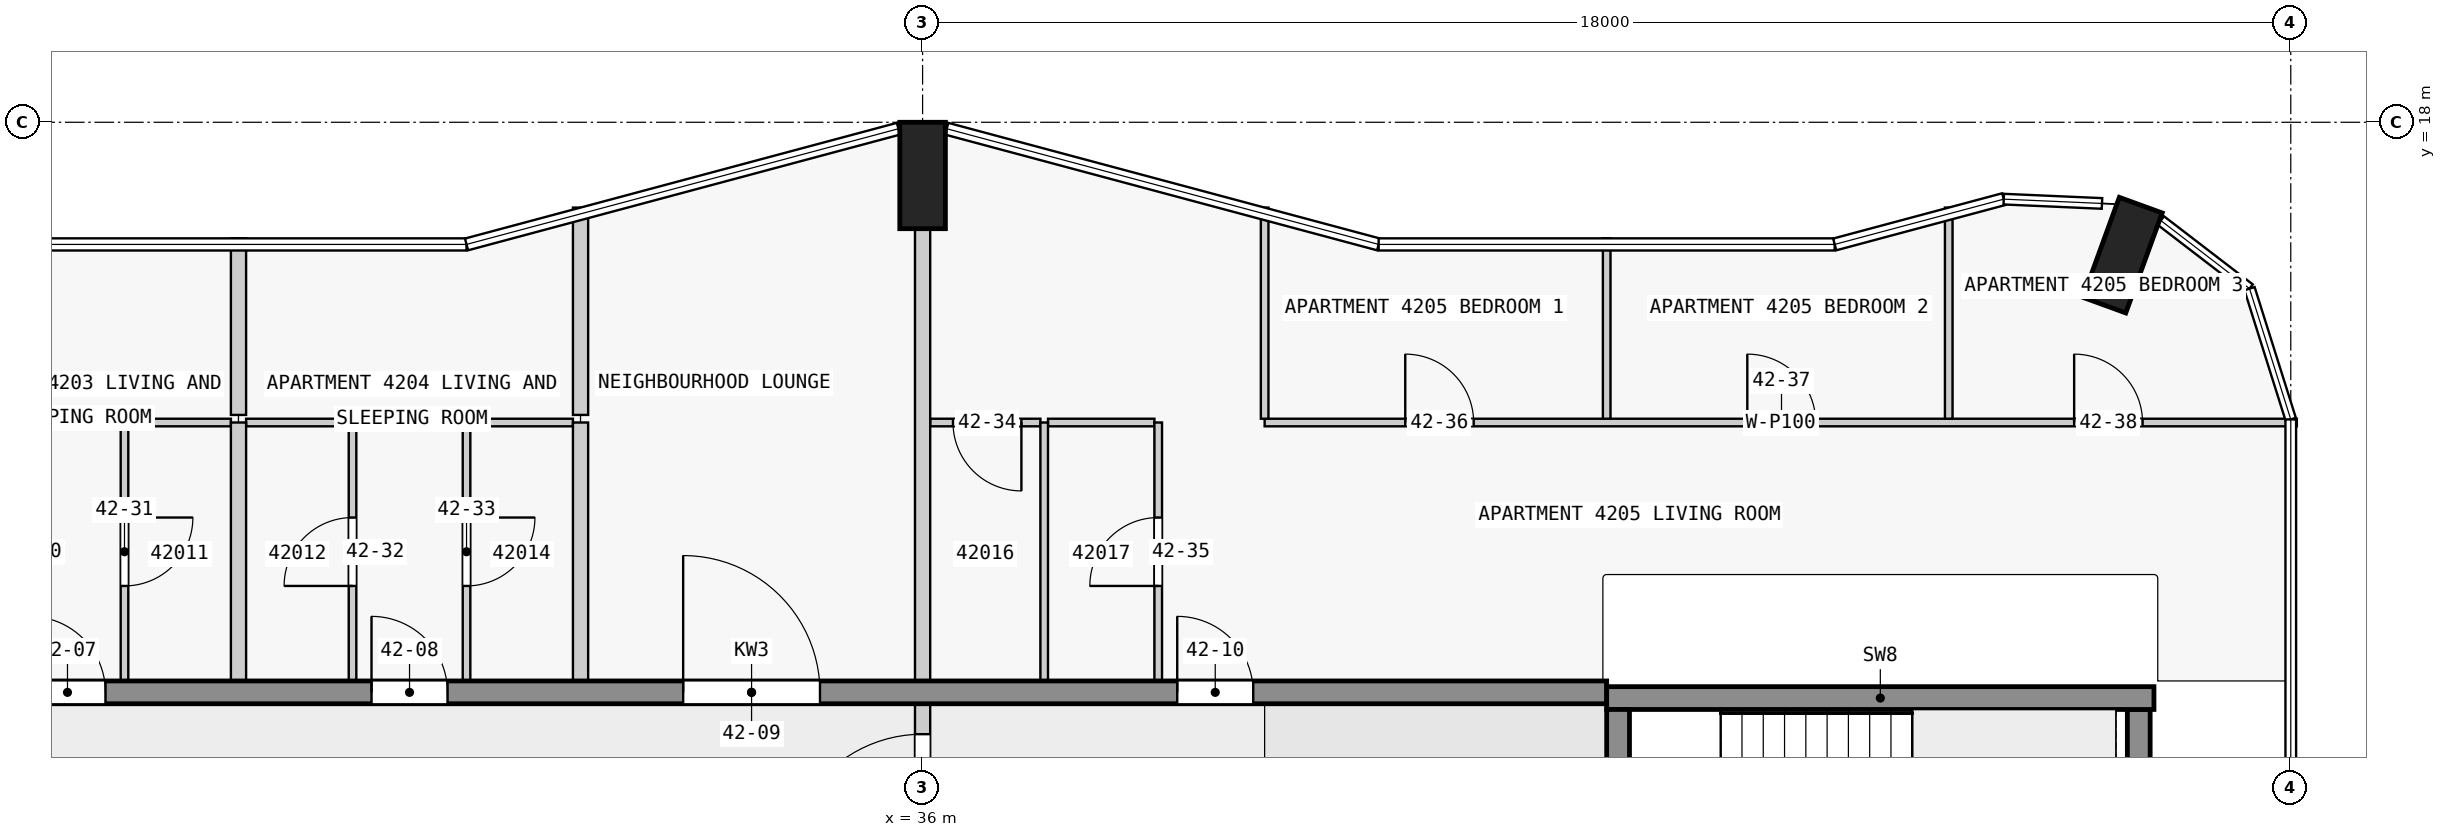
"""IFC4 building model, lengths in metres.
Left out: names, types, materials, properties, quantities, classifications, styles, units other than length and angle.
Written with IfcOpenShell. Run it as: python <this file> out.ifc"""

import sys

from ifc_helpers import new_model, si_unit, direction, frame, frame_2d, origin, origin_2d, place, context, subcontext, project, spatial, rectangle, extrude, element, fill, save


model = new_model("IFC4")
c1 = context("Model", 3, precision=1e-05, world=origin(), true_north=direction((0.0, 1.0)))
c2 = subcontext(c1, "Body", "Model", "MODEL_VIEW")
j1 = project(units=[si_unit("LENGTHUNIT", "METRE"), si_unit("PLANEANGLEUNIT", "RADIAN")], contexts=[c1])
p1 = place(None, origin())
s1 = spatial("IfcSite", under=j1, at=p1, CompositionType="ELEMENT")
p2 = place(p1, origin())
s2 = spatial("IfcBuilding", under=s1, at=p2, CompositionType="ELEMENT")
p3 = place(p2, frame((0.0, 0.0, 163.9)))
s3 = spatial("IfcBuildingStorey", under=s2, at=p3, CompositionType="ELEMENT", Elevation=163.9)
for number, where, z_axis, x_axis in (
    (1, (51.787, 16.252, 0.0), (0.0, 0.0, 1.0), (-0.94, 0.342, 0.0)),
    (2, (36.0, 17.3, 0.0), (0.0, 0.0, 1.0), (1.0, 0.0, 0.0)),
):
    element("IfcColumn", number, at=place(p3, frame(where, z_axis=z_axis, x_axis=x_axis)), inside=s3, PredefinedType="COLUMN", context=c2, shape_type="SweptSolid", body=[
        extrude(rectangle(XDim=0.6, YDim=1.4, at=origin_2d()), origin(), (0.0, 0.0, 1.0), 3.5),
    ])
p4 = place(p3, frame((45.15, 7.725, 0.0), z_axis=(0.0, 0.0, 1.0), x_axis=(0.0, 1.0, 0.0)))
e3 = element("IfcWall", 3, at=p4, inside=s3, PredefinedType="SHEAR", context=c2, shape_type="SweptSolid", body=[
    extrude(rectangle(XDim=2.55, YDim=0.3, at=frame_2d((1.275, 0.0))), origin(), (0.0, 0.0, 1.0), 3.5),
])
p5 = place(p4, frame((0.725, 0.0, 0.0)))
e4 = element("IfcOpeningElement", 4, at=p5, cuts=e3, PredefinedType="OPENING", context=c2, shape_type="SweptSolid", body=[
    extrude(rectangle(XDim=1.1, YDim=2.1, at=frame_2d((0.55, 1.05))), frame((0.0, 0.16, 0.0), z_axis=(0.0, -1.0, 0.0), x_axis=(1.0, 0.0, 0.0)), (0.0, 0.0, 1.0), 0.32),
])
p6 = place(p3, frame((52.0, 7.725, 0.0), z_axis=(0.0, 0.0, 1.0), x_axis=(0.0, 1.0, 0.0)))
e5 = element("IfcWall", 5, at=p6, inside=s3, PredefinedType="SHEAR", context=c2, shape_type="SweptSolid", body=[
    extrude(rectangle(XDim=2.55, YDim=0.3, at=frame_2d((1.275, 0.0))), origin(), (0.0, 0.0, 1.0), 3.5),
])
p7 = place(p3, frame((45.0, 10.425, 0.0), z_axis=(0.0, 0.0, 1.0), x_axis=(1.0, 0.0, 0.0)))
e6 = element("IfcWall", 6, at=p7, inside=s3, PredefinedType="SHEAR", context=c2, shape_type="SweptSolid", body=[
    extrude(rectangle(XDim=7.2, YDim=0.3, at=frame_2d((3.6, 0.0))), origin(), (0.0, 0.0, 1.0), 3.5),
])
p8 = place(p3, frame((22.5, 10.5, 0.0), z_axis=(0.0, 0.0, 1.0), x_axis=(1.0, 0.0, 0.0)))
e7 = element("IfcWall", 7, at=p8, inside=s3, PredefinedType="SHEAR", context=c2, shape_type="SweptSolid", body=[
    extrude(rectangle(XDim=22.5, YDim=0.3, at=frame_2d((11.25, 0.0))), origin(), (0.0, 0.0, 1.0), 3.25),
])
p9 = place(p8, frame((1.75, 0.0, 0.0)))
e8 = element("IfcOpeningElement", 8, at=p9, cuts=e7, PredefinedType="OPENING", context=c2, shape_type="SweptSolid", body=[
    extrude(rectangle(XDim=1.0, YDim=2.1, at=frame_2d((0.5, 1.05))), frame((0.0, 0.16, 0.0), z_axis=(0.0, -1.0, 0.0), x_axis=(1.0, 0.0, 0.0)), (0.0, 0.0, 1.0), 0.32),
])
p10 = place(p8, frame((6.25, 0.0, 0.0)))
e9 = element("IfcOpeningElement", 9, at=p10, cuts=e7, PredefinedType="OPENING", context=c2, shape_type="SweptSolid", body=[
    extrude(rectangle(XDim=1.0, YDim=2.1, at=frame_2d((0.5, 1.05))), frame((0.0, 0.16, 0.0), z_axis=(0.0, -1.0, 0.0), x_axis=(1.0, 0.0, 0.0)), (0.0, 0.0, 1.0), 0.32),
])
p11 = place(p8, frame((10.35, 0.0, 0.0)))
e10 = element("IfcOpeningElement", 10, at=p11, cuts=e7, PredefinedType="OPENING", context=c2, shape_type="SweptSolid", body=[
    extrude(rectangle(XDim=1.8, YDim=2.1, at=frame_2d((0.9, 1.05))), frame((0.0, 0.16, 0.0), z_axis=(0.0, -1.0, 0.0), x_axis=(1.0, 0.0, 0.0)), (0.0, 0.0, 1.0), 0.32),
])
p12 = place(p8, frame((16.85, 0.0, 0.0)))
e11 = element("IfcOpeningElement", 11, at=p12, cuts=e7, PredefinedType="OPENING", context=c2, shape_type="SweptSolid", body=[
    extrude(rectangle(XDim=1.0, YDim=2.1, at=frame_2d((0.5, 1.05))), frame((0.0, 0.16, 0.0), z_axis=(0.0, -1.0, 0.0), x_axis=(1.0, 0.0, 0.0)), (0.0, 0.0, 1.0), 0.32),
])
for number, where, z_axis, x_axis in (
    (12, (26.9, 14.05, 0.0), (0.0, 0.0, 1.0), (-1.0, 0.0, 0.0)),
    (13, (28.45, 14.05, 0.0), (0.0, 0.0, 1.0), (-1.0, 0.0, 0.0)),
    (14, (31.4, 14.05, 0.0), (0.0, 0.0, 1.0), (-1.0, 0.0, 0.0)),
):
    element("IfcWall", number, at=place(p3, frame(where, z_axis=z_axis, x_axis=x_axis)), inside=s3, PredefinedType="PARTITIONING", context=c2, shape_type="SweptSolid", body=[
        extrude(rectangle(XDim=1.35, YDim=0.1, at=frame_2d((0.675, 0.0))), origin(), (0.0, 0.0, 1.0), 3.25),
    ])
p13 = place(p3, frame((37.55, 14.05, 0.0), z_axis=(0.0, 0.0, 1.0), x_axis=(-1.0, 0.0, 0.0)))
e15 = element("IfcWall", 15, at=p13, inside=s3, PredefinedType="PARTITIONING", context=c2, shape_type="SweptSolid", body=[
    extrude(rectangle(XDim=1.45, YDim=0.1, at=frame_2d((0.725, 0.0))), origin(), (0.0, 0.0, 1.0), 3.25),
])
p14 = place(p13, frame((0.25, 0.0, 0.0)))
e16 = element("IfcOpeningElement", 16, at=p14, cuts=e15, PredefinedType="OPENING", context=c2, shape_type="SweptSolid", body=[
    extrude(rectangle(XDim=0.9, YDim=2.1, at=frame_2d((0.45, 1.05))), frame((0.0, 0.06, 0.0), z_axis=(0.0, -1.0, 0.0), x_axis=(1.0, 0.0, 0.0)), (0.0, 0.0, 1.0), 0.12),
])
p15 = place(p3, frame((39.05, 14.05, 0.0), z_axis=(0.0, 0.0, 1.0), x_axis=(-1.0, 0.0, 0.0)))
e17 = element("IfcWall", 17, at=p15, inside=s3, PredefinedType="PARTITIONING", context=c2, shape_type="SweptSolid", body=[
    extrude(rectangle(XDim=1.4, YDim=0.1, at=frame_2d((0.7, 0.0))), origin(), (0.0, 0.0, 1.0), 3.25),
])
p16 = place(p3, frame((40.5, 14.05, 0.0), z_axis=(0.0, 0.0, 1.0), x_axis=(1.0, 0.0, 0.0)))
e18 = element("IfcWall", 18, at=p16, inside=s3, PredefinedType="PARTITIONING", context=c2, shape_type="SweptSolid", body=[
    extrude(rectangle(XDim=13.58, YDim=0.1, at=frame_2d((6.79, 0.0))), origin(), (0.0, 0.0, 1.0), 3.25),
])
p17 = place(p16, frame((1.85, 0.0, 0.0)))
e19 = element("IfcOpeningElement", 19, at=p17, cuts=e18, PredefinedType="OPENING", context=c2, shape_type="SweptSolid", body=[
    extrude(rectangle(XDim=0.9, YDim=2.1, at=frame_2d((0.45, 1.05))), frame((0.0, 0.06, 0.0), z_axis=(0.0, -1.0, 0.0), x_axis=(1.0, 0.0, 0.0)), (0.0, 0.0, 1.0), 0.12),
])
p18 = place(p16, frame((6.35, 0.0, 0.0)))
e20 = element("IfcOpeningElement", 20, at=p18, cuts=e18, PredefinedType="OPENING", context=c2, shape_type="SweptSolid", body=[
    extrude(rectangle(XDim=0.9, YDim=2.1, at=frame_2d((0.45, 1.05))), frame((0.0, 0.06, 0.0), z_axis=(0.0, -1.0, 0.0), x_axis=(1.0, 0.0, 0.0)), (0.0, 0.0, 1.0), 0.12),
])
p19 = place(p16, frame((10.65, 0.0, 0.0)))
e21 = element("IfcOpeningElement", 21, at=p19, cuts=e18, PredefinedType="OPENING", context=c2, shape_type="SweptSolid", body=[
    extrude(rectangle(XDim=0.9, YDim=2.1, at=frame_2d((0.45, 1.05))), frame((0.0, 0.06, 0.0), z_axis=(0.0, -1.0, 0.0), x_axis=(1.0, 0.0, 0.0)), (0.0, 0.0, 1.0), 0.12),
])
p20 = place(p3, frame((25.5, 14.05, 0.0), z_axis=(0.0, 0.0, 1.0), x_axis=(0.0, -1.0, 0.0)))
e22 = element("IfcWall", 22, at=p20, inside=s3, PredefinedType="PARTITIONING", context=c2, shape_type="SweptSolid", body=[
    extrude(rectangle(XDim=3.4, YDim=0.1, at=frame_2d((1.7, 0.0))), origin(), (0.0, 0.0, 1.0), 3.25),
])
p21 = place(p20, frame((1.25, 0.0, 0.0)))
e23 = element("IfcOpeningElement", 23, at=p21, cuts=e22, PredefinedType="OPENING", context=c2, shape_type="SweptSolid", body=[
    extrude(rectangle(XDim=0.9, YDim=2.1, at=frame_2d((0.45, 1.05))), frame((0.0, 0.06, 0.0), z_axis=(0.0, -1.0, 0.0), x_axis=(1.0, 0.0, 0.0)), (0.0, 0.0, 1.0), 0.12),
])
p22 = place(p3, frame((27.0, 16.473, 0.0), z_axis=(0.0, 0.0, 1.0), x_axis=(0.0, -1.0, 0.0)))
e24 = element("IfcWall", 24, at=p22, inside=s3, PredefinedType="PARTITIONING", context=c2, shape_type="SweptSolid", body=[
    extrude(rectangle(XDim=2.323, YDim=0.2, at=frame_2d((1.162, 0.0))), origin(), (0.0, 0.0, 1.0), 3.25),
])
p23 = place(p3, frame((27.0, 10.65, 0.0), z_axis=(0.0, 0.0, 1.0), x_axis=(0.0, 1.0, 0.0)))
e25 = element("IfcWall", 25, at=p23, inside=s3, PredefinedType="PARTITIONING", context=c2, shape_type="SweptSolid", body=[
    extrude(rectangle(XDim=3.4, YDim=0.2, at=frame_2d((1.7, 0.0))), origin(), (0.0, 0.0, 1.0), 3.25),
])
p24 = place(p3, frame((28.5, 10.65, 0.0), z_axis=(0.0, 0.0, 1.0), x_axis=(0.0, 1.0, 0.0)))
e26 = element("IfcWall", 26, at=p24, inside=s3, PredefinedType="PARTITIONING", context=c2, shape_type="SweptSolid", body=[
    extrude(rectangle(XDim=3.4, YDim=0.1, at=frame_2d((1.7, 0.0))), origin(), (0.0, 0.0, 1.0), 3.25),
])
p25 = place(p24, frame((1.25, 0.0, 0.0)))
e27 = element("IfcOpeningElement", 27, at=p25, cuts=e26, PredefinedType="OPENING", context=c2, shape_type="SweptSolid", body=[
    extrude(rectangle(XDim=0.9, YDim=2.1, at=frame_2d((0.45, 1.05))), frame((0.0, 0.06, 0.0), z_axis=(0.0, -1.0, 0.0), x_axis=(1.0, 0.0, 0.0)), (0.0, 0.0, 1.0), 0.12),
])
p26 = place(p3, frame((30.0, 14.05, 0.0), z_axis=(0.0, 0.0, 1.0), x_axis=(0.0, -1.0, 0.0)))
e28 = element("IfcWall", 28, at=p26, inside=s3, PredefinedType="PARTITIONING", context=c2, shape_type="SweptSolid", body=[
    extrude(rectangle(XDim=3.4, YDim=0.1, at=frame_2d((1.7, 0.0))), origin(), (0.0, 0.0, 1.0), 3.25),
])
p27 = place(p26, frame((1.25, 0.0, 0.0)))
e29 = element("IfcOpeningElement", 29, at=p27, cuts=e28, PredefinedType="OPENING", context=c2, shape_type="SweptSolid", body=[
    extrude(rectangle(XDim=0.9, YDim=2.1, at=frame_2d((0.45, 1.05))), frame((0.0, 0.06, 0.0), z_axis=(0.0, -1.0, 0.0), x_axis=(1.0, 0.0, 0.0)), (0.0, 0.0, 1.0), 0.12),
])
p28 = place(p3, frame((31.5, 16.878, 0.0), z_axis=(0.0, 0.0, 1.0), x_axis=(0.0, -1.0, 0.0)))
e30 = element("IfcWall", 30, at=p28, inside=s3, PredefinedType="PARTITIONING", context=c2, shape_type="SweptSolid", body=[
    extrude(rectangle(XDim=2.728, YDim=0.2, at=frame_2d((1.364, 0.0))), origin(), (0.0, 0.0, 1.0), 3.25),
])
p29 = place(p3, frame((31.5, 10.65, 0.0), z_axis=(0.0, 0.0, 1.0), x_axis=(0.0, 1.0, 0.0)))
e31 = element("IfcWall", 31, at=p29, inside=s3, PredefinedType="PARTITIONING", context=c2, shape_type="SweptSolid", body=[
    extrude(rectangle(XDim=3.4, YDim=0.2, at=frame_2d((1.7, 0.0))), origin(), (0.0, 0.0, 1.0), 3.25),
])
p30 = place(p3, frame((36.0, 10.65, 0.0), z_axis=(0.0, 0.0, 1.0), x_axis=(0.0, 1.0, 0.0)))
e32 = element("IfcWall", 32, at=p30, inside=s3, PredefinedType="PARTITIONING", context=c2, shape_type="SweptSolid", body=[
    extrude(rectangle(XDim=5.95, YDim=0.2, at=frame_2d((2.975, 0.0))), origin(), (0.0, 0.0, 1.0), 3.25),
])
p31 = place(p3, frame((37.6, 10.65, 0.0), z_axis=(0.0, 0.0, 1.0), x_axis=(0.0, 1.0, 0.0)))
e33 = element("IfcWall", 33, at=p31, inside=s3, PredefinedType="PARTITIONING", context=c2, shape_type="SweptSolid", body=[
    extrude(rectangle(XDim=3.4, YDim=0.1, at=frame_2d((1.7, 0.0))), origin(), (0.0, 0.0, 1.0), 3.25),
])
p32 = place(p3, frame((39.1, 10.65, 0.0), z_axis=(0.0, 0.0, 1.0), x_axis=(0.0, 1.0, 0.0)))
e34 = element("IfcWall", 34, at=p32, inside=s3, PredefinedType="PARTITIONING", context=c2, shape_type="SweptSolid", body=[
    extrude(rectangle(XDim=3.4, YDim=0.1, at=frame_2d((1.7, 0.0))), origin(), (0.0, 0.0, 1.0), 3.25),
])
p33 = place(p32, frame((1.25, 0.0, 0.0)))
e35 = element("IfcOpeningElement", 35, at=p33, cuts=e34, PredefinedType="OPENING", context=c2, shape_type="SweptSolid", body=[
    extrude(rectangle(XDim=0.9, YDim=2.1, at=frame_2d((0.45, 1.05))), frame((0.0, 0.06, 0.0), z_axis=(0.0, -1.0, 0.0), x_axis=(1.0, 0.0, 0.0)), (0.0, 0.0, 1.0), 0.12),
])
p34 = place(p3, frame((40.5, 16.878, 0.0), z_axis=(0.0, 0.0, 1.0), x_axis=(0.0, -1.0, 0.0)))
e36 = element("IfcWall", 36, at=p34, inside=s3, PredefinedType="PARTITIONING", context=c2, shape_type="SweptSolid", body=[
    extrude(rectangle(XDim=2.778, YDim=0.1, at=frame_2d((1.389, 0.0))), origin(), (0.0, 0.0, 1.0), 3.25),
])
p35 = place(p3, frame((45.0, 14.1, 0.0), z_axis=(0.0, 0.0, 1.0), x_axis=(0.0, 1.0, 0.0)))
e37 = element("IfcWall", 37, at=p35, inside=s3, PredefinedType="PARTITIONING", context=c2, shape_type="SweptSolid", body=[
    extrude(rectangle(XDim=2.373, YDim=0.1, at=frame_2d((1.187, 0.0))), origin(), (0.0, 0.0, 1.0), 3.25),
])
p36 = place(p3, frame((49.5, 14.1, 0.0), z_axis=(0.0, 0.0, 1.0), x_axis=(0.0, 1.0, 0.0)))
e38 = element("IfcWall", 38, at=p36, inside=s3, PredefinedType="PARTITIONING", context=c2, shape_type="SweptSolid", body=[
    extrude(rectangle(XDim=2.778, YDim=0.1, at=frame_2d((1.389, 0.0))), origin(), (0.0, 0.0, 1.0), 3.25),
])
p37 = place(p3, frame((36.0, 7.45, 0.0), z_axis=(0.0, 0.0, 1.0), x_axis=(0.0, 1.0, 0.0)))
e39 = element("IfcWall", 39, at=p37, inside=s3, PredefinedType="PARTITIONING", context=c2, shape_type="SweptSolid", body=[
    extrude(rectangle(XDim=3.1, YDim=0.2, at=frame_2d((1.55, 0.0))), origin(), (0.0, 0.0, 1.0), 3.25),
])
p38 = place(p37, frame((0.7, 0.0, 0.0)))
e40 = element("IfcOpeningElement", 40, at=p38, cuts=e39, PredefinedType="OPENING", context=c2, shape_type="SweptSolid", body=[
    extrude(rectangle(XDim=1.8, YDim=2.1, at=frame_2d((0.9, 1.05))), frame((0.0, 0.11, 0.0), z_axis=(0.0, -1.0, 0.0), x_axis=(1.0, 0.0, 0.0)), (0.0, 0.0, 1.0), 0.22),
])
p39 = place(p9, origin())
e41 = element("IfcDoor", 41, at=p39, inside=s3, OperationType="SINGLE_SWING_LEFT", PredefinedType="DOOR", context=c2, shape_type="SweptSolid", body=[
    extrude(rectangle(XDim=1.0, YDim=2.1, at=frame_2d((0.5, 1.05))), frame((0.0, 0.025, 0.0), z_axis=(0.0, -1.0, 0.0), x_axis=(1.0, 0.0, 0.0)), (0.0, 0.0, 1.0), 0.05),
])
fill(e8, e41)
p40 = place(p10, origin())
e42 = element("IfcDoor", 42, at=p40, inside=s3, OperationType="SINGLE_SWING_LEFT", PredefinedType="DOOR", context=c2, shape_type="SweptSolid", body=[
    extrude(rectangle(XDim=1.0, YDim=2.1, at=frame_2d((0.5, 1.05))), frame((0.0, 0.025, 0.0), z_axis=(0.0, -1.0, 0.0), x_axis=(1.0, 0.0, 0.0)), (0.0, 0.0, 1.0), 0.05),
])
fill(e9, e42)
p41 = place(p11, origin())
e43 = element("IfcDoor", 43, at=p41, inside=s3, OperationType="SINGLE_SWING_LEFT", PredefinedType="DOOR", context=c2, shape_type="SweptSolid", body=[
    extrude(rectangle(XDim=1.8, YDim=2.1, at=frame_2d((0.9, 1.05))), frame((0.0, 0.025, 0.0), z_axis=(0.0, -1.0, 0.0), x_axis=(1.0, 0.0, 0.0)), (0.0, 0.0, 1.0), 0.05),
])
fill(e10, e43)
p42 = place(p12, origin())
e44 = element("IfcDoor", 44, at=p42, inside=s3, OperationType="SINGLE_SWING_RIGHT", PredefinedType="DOOR", context=c2, shape_type="SweptSolid", body=[
    extrude(rectangle(XDim=1.0, YDim=2.1, at=frame_2d((0.5, 1.05))), frame((0.0, 0.025, 0.0), z_axis=(0.0, -1.0, 0.0), x_axis=(1.0, 0.0, 0.0)), (0.0, 0.0, 1.0), 0.05),
])
fill(e11, e44)
p43 = place(p38, origin())
e45 = element("IfcDoor", 45, at=p43, inside=s3, OperationType="SINGLE_SWING_RIGHT", PredefinedType="DOOR", context=c2, shape_type="SweptSolid", body=[
    extrude(rectangle(XDim=1.8, YDim=2.1, at=frame_2d((0.9, 1.05))), frame((0.0, 0.025, 0.0), z_axis=(0.0, -1.0, 0.0), x_axis=(1.0, 0.0, 0.0)), (0.0, 0.0, 1.0), 0.05),
])
fill(e40, e45)
p44 = place(p21, origin())
e46 = element("IfcDoor", 46, at=p44, inside=s3, OperationType="SINGLE_SWING_LEFT", PredefinedType="DOOR", context=c2, shape_type="SweptSolid", body=[
    extrude(rectangle(XDim=0.9, YDim=2.1, at=frame_2d((0.45, 1.05))), frame((0.0, 0.025, 0.0), z_axis=(0.0, -1.0, 0.0), x_axis=(1.0, 0.0, 0.0)), (0.0, 0.0, 1.0), 0.05),
])
fill(e23, e46)
p45 = place(p25, origin())
e47 = element("IfcDoor", 47, at=p45, inside=s3, OperationType="SINGLE_SWING_LEFT", PredefinedType="DOOR", context=c2, shape_type="SweptSolid", body=[
    extrude(rectangle(XDim=0.9, YDim=2.1, at=frame_2d((0.45, 1.05))), frame((0.0, 0.025, 0.0), z_axis=(0.0, -1.0, 0.0), x_axis=(1.0, 0.0, 0.0)), (0.0, 0.0, 1.0), 0.05),
])
fill(e27, e47)
p46 = place(p27, origin())
e48 = element("IfcDoor", 48, at=p46, inside=s3, OperationType="SINGLE_SWING_LEFT", PredefinedType="DOOR", context=c2, shape_type="SweptSolid", body=[
    extrude(rectangle(XDim=0.9, YDim=2.1, at=frame_2d((0.45, 1.05))), frame((0.0, 0.025, 0.0), z_axis=(0.0, -1.0, 0.0), x_axis=(1.0, 0.0, 0.0)), (0.0, 0.0, 1.0), 0.05),
])
fill(e29, e48)
p47 = place(p14, origin())
e49 = element("IfcDoor", 49, at=p47, inside=s3, OperationType="SINGLE_SWING_LEFT", PredefinedType="DOOR", context=c2, shape_type="SweptSolid", body=[
    extrude(rectangle(XDim=0.9, YDim=2.1, at=frame_2d((0.45, 1.05))), frame((0.0, 0.025, 0.0), z_axis=(0.0, -1.0, 0.0), x_axis=(1.0, 0.0, 0.0)), (0.0, 0.0, 1.0), 0.05),
])
fill(e16, e49)
p48 = place(p33, origin())
e50 = element("IfcDoor", 50, at=p48, inside=s3, OperationType="SINGLE_SWING_LEFT", PredefinedType="DOOR", context=c2, shape_type="SweptSolid", body=[
    extrude(rectangle(XDim=0.9, YDim=2.1, at=frame_2d((0.45, 1.05))), frame((0.0, 0.025, 0.0), z_axis=(0.0, -1.0, 0.0), x_axis=(1.0, 0.0, 0.0)), (0.0, 0.0, 1.0), 0.05),
])
fill(e35, e50)
p49 = place(p17, origin())
e51 = element("IfcDoor", 51, at=p49, inside=s3, OperationType="SINGLE_SWING_LEFT", PredefinedType="DOOR", context=c2, shape_type="SweptSolid", body=[
    extrude(rectangle(XDim=0.9, YDim=2.1, at=frame_2d((0.45, 1.05))), frame((0.0, 0.025, 0.0), z_axis=(0.0, -1.0, 0.0), x_axis=(1.0, 0.0, 0.0)), (0.0, 0.0, 1.0), 0.05),
])
fill(e19, e51)
p50 = place(p18, origin())
e52 = element("IfcDoor", 52, at=p50, inside=s3, OperationType="SINGLE_SWING_RIGHT", PredefinedType="DOOR", context=c2, shape_type="SweptSolid", body=[
    extrude(rectangle(XDim=0.9, YDim=2.1, at=frame_2d((0.45, 1.05))), frame((0.0, 0.025, 0.0), z_axis=(0.0, -1.0, 0.0), x_axis=(1.0, 0.0, 0.0)), (0.0, 0.0, 1.0), 0.05),
])
fill(e20, e52)
p51 = place(p19, origin())
e53 = element("IfcDoor", 53, at=p51, inside=s3, OperationType="SINGLE_SWING_RIGHT", PredefinedType="DOOR", context=c2, shape_type="SweptSolid", body=[
    extrude(rectangle(XDim=0.9, YDim=2.1, at=frame_2d((0.45, 1.05))), frame((0.0, 0.025, 0.0), z_axis=(0.0, -1.0, 0.0), x_axis=(1.0, 0.0, 0.0)), (0.0, 0.0, 1.0), 0.05),
])
fill(e21, e53)
save(model, sys.argv[1])
